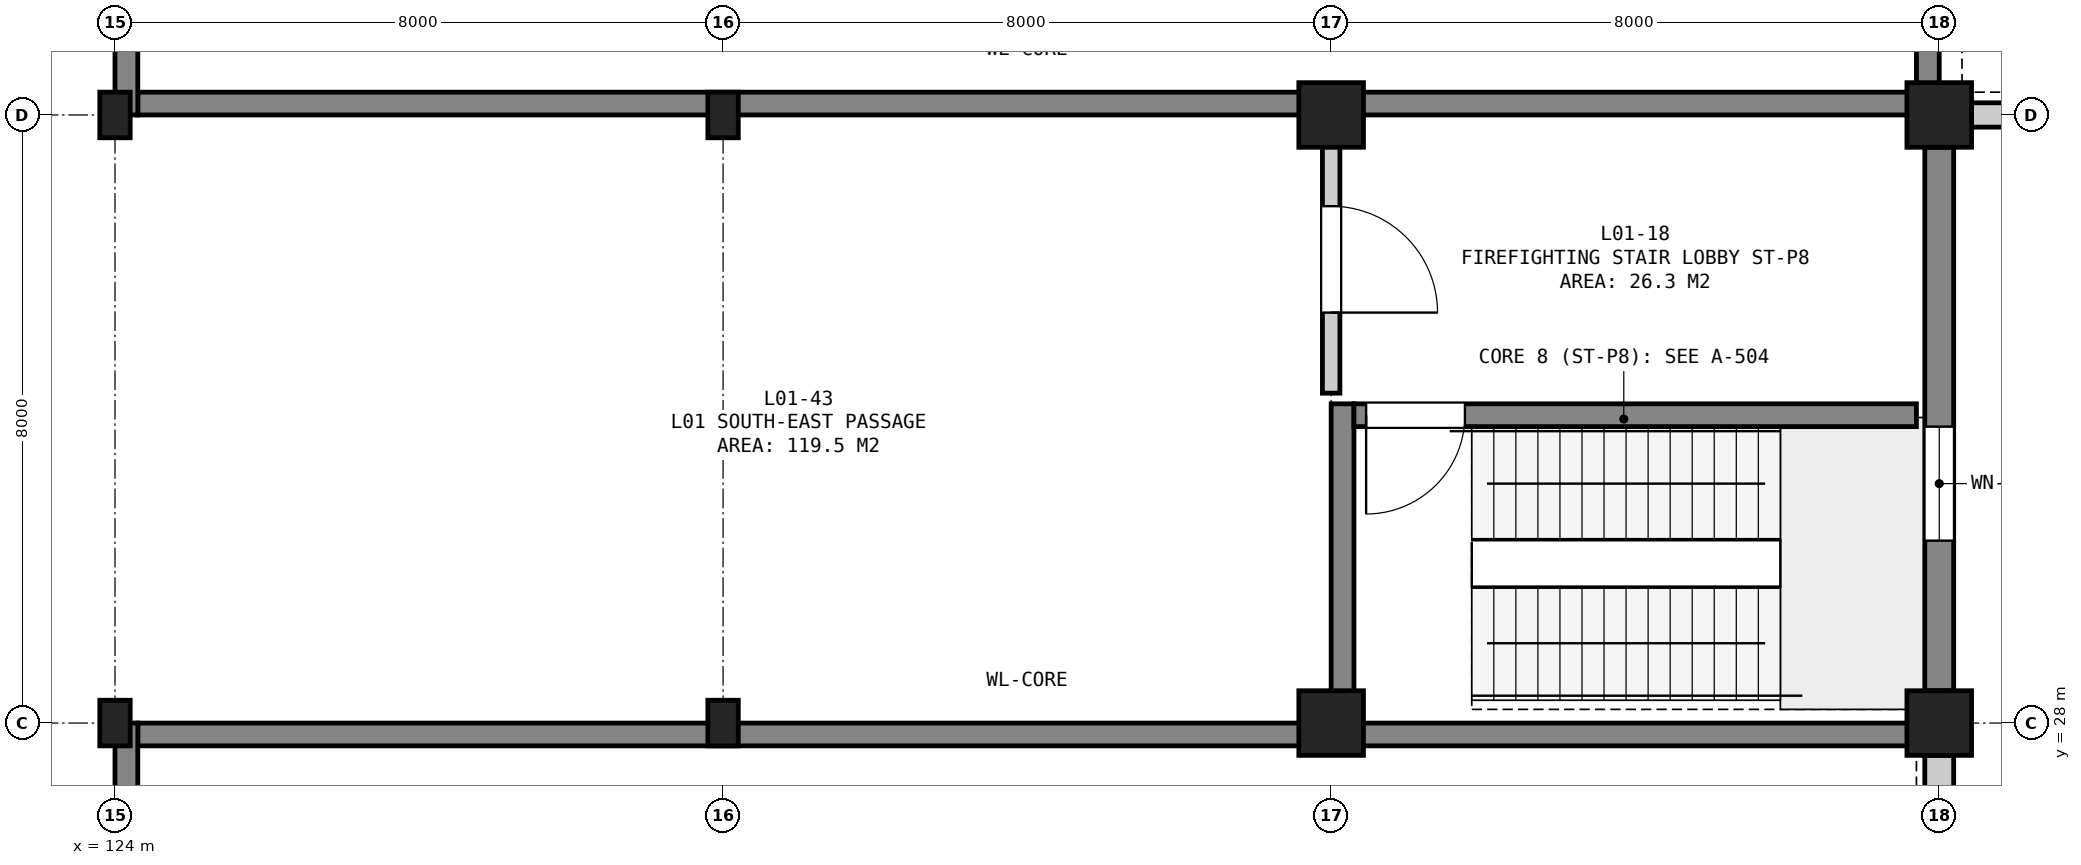
"""IFC4 building model, lengths in metres.
Left out: names, types, materials, properties, quantities, classifications, styles, units other than length and angle.
Written with IfcOpenShell. Run it as: python <this file> out.ifc"""

import sys

from ifc_helpers import new_model, si_unit, direction, frame, frame_2d, origin, origin_2d, place, context, subcontext, project, spatial, rectangle, extrude, element, fill, save


model = new_model("IFC4")
c1 = context("Model", 3, precision=1e-05, world=origin(), true_north=direction((0.0, 1.0)))
c2 = subcontext(c1, "Body", "Model", "MODEL_VIEW")
j1 = project(units=[si_unit("LENGTHUNIT", "METRE"), si_unit("PLANEANGLEUNIT", "RADIAN")], contexts=[c1])
p1 = place(None, origin())
s1 = spatial("IfcSite", under=j1, at=p1, CompositionType="ELEMENT")
p2 = place(p1, origin())
s2 = spatial("IfcBuilding", under=s1, at=p2, CompositionType="ELEMENT")
p3 = place(p2, frame((0.0, 0.0, 5.4)))
s3 = spatial("IfcBuildingStorey", under=s2, at=p3, CompositionType="ELEMENT", Elevation=5.4)
for number, where, z_axis, x_axis in (
    (1, (124.0, 28.0, 0.0), (0.0, 0.0, 1.0), (1.0, 0.0, 0.0)),
    (2, (124.0, 36.0, 0.0), (0.0, 0.0, 1.0), (1.0, 0.0, 0.0)),
    (3, (132.0, 28.0, 0.0), (0.0, 0.0, 1.0), (1.0, 0.0, 0.0)),
    (4, (132.0, 36.0, 0.0), (0.0, 0.0, 1.0), (1.0, 0.0, 0.0)),
):
    element("IfcColumn", number, at=place(p3, frame(where, z_axis=z_axis, x_axis=x_axis)), inside=s3, PredefinedType="COLUMN", context=c2, shape_type="SweptSolid", body=[
        extrude(rectangle(XDim=0.4, YDim=0.6, at=origin_2d()), origin(), (0.0, 0.0, 1.0), 5.4),
    ])
for number, where, z_axis, x_axis in (
    (5, (140.0, 28.0, 0.0), (0.0, 0.0, 1.0), (1.0, 0.0, 0.0)),
    (6, (140.0, 36.0, 0.0), (0.0, 0.0, 1.0), (1.0, 0.0, 0.0)),
    (7, (148.0, 28.0, 0.0), (0.0, 0.0, 1.0), (1.0, 0.0, 0.0)),
    (8, (148.0, 36.0, 0.0), (0.0, 0.0, 1.0), (1.0, 0.0, 0.0)),
):
    element("IfcColumn", number, at=place(p3, frame(where, z_axis=z_axis, x_axis=x_axis)), inside=s3, PredefinedType="COLUMN", context=c2, shape_type="SweptSolid", body=[
        extrude(rectangle(XDim=0.85, YDim=0.85, at=origin_2d()), origin(), (0.0, 0.0, 1.0), 5.4),
    ])
p4 = place(p3, frame((148.0, 13.1, 0.0), z_axis=(0.0, 0.0, 1.0), x_axis=(0.0, 1.0, 0.0)))
e9 = element("IfcWall", 9, at=p4, inside=s3, PredefinedType="SOLIDWALL", context=c2, shape_type="SweptSolid", body=[
    extrude(rectangle(XDim=14.475, YDim=0.38, at=frame_2d((7.237, 0.0))), origin(), (0.0, 0.0, 1.0), 4.035),
])
p5 = place(p3, frame((148.0, 28.425, 0.0), z_axis=(0.0, 0.0, 1.0), x_axis=(0.0, 1.0, 0.0)))
e10 = element("IfcWall", 10, at=p5, inside=s3, PredefinedType="SOLIDWALL", context=c2, shape_type="SweptSolid", body=[
    extrude(rectangle(XDim=7.15, YDim=0.38, at=frame_2d((3.575, 0.0))), origin(), (0.0, 0.0, 1.0), 4.735),
])
p6 = place(p5, frame((1.975, 0.0, 0.9)))
e11 = element("IfcOpeningElement", 11, at=p6, cuts=e10, PredefinedType="OPENING", context=c2, shape_type="SweptSolid", body=[
    extrude(rectangle(XDim=1.5, YDim=1.85, at=frame_2d((0.75, 0.925))), frame((0.0, 0.202, 0.0), z_axis=(0.0, -1.0, 0.0), x_axis=(1.0, 0.0, 0.0)), (0.0, 0.0, 1.0), 0.404),
])
p7 = place(p3, frame((148.425, 36.0, 0.0), z_axis=(0.0, 0.0, 1.0), x_axis=(1.0, 0.0, 0.0)))
e12 = element("IfcWall", 12, at=p7, inside=s3, PredefinedType="SOLIDWALL", context=c2, shape_type="SweptSolid", body=[
    extrude(rectangle(XDim=12.8, YDim=0.32, at=frame_2d((6.4, 0.0))), origin(), (0.0, 0.0, 1.0), 4.435),
])
p8 = place(p3, frame((124.3, 27.85, 0.0), z_axis=(0.0, 0.0, 1.0), x_axis=(1.0, 0.0, 0.0)))
e13 = element("IfcWall", 13, at=p8, inside=s3, PredefinedType="SHEAR", context=c2, shape_type="SweptSolid", body=[
    extrude(rectangle(XDim=23.4, YDim=0.3, at=frame_2d((11.7, 0.0))), origin(), (0.0, 0.0, 1.0), 5.1),
])
p9 = place(p3, frame((124.15, 12.8, 0.0), z_axis=(0.0, 0.0, 1.0), x_axis=(0.0, 1.0, 0.0)))
e14 = element("IfcWall", 14, at=p9, inside=s3, PredefinedType="SHEAR", context=c2, shape_type="SweptSolid", body=[
    extrude(rectangle(XDim=15.2, YDim=0.3, at=frame_2d((7.6, 0.0))), origin(), (0.0, 0.0, 1.0), 5.1),
])
p10 = place(p3, frame((124.3, 36.15, 0.0), z_axis=(0.0, 0.0, 1.0), x_axis=(1.0, 0.0, 0.0)))
e15 = element("IfcWall", 15, at=p10, inside=s3, PredefinedType="SHEAR", context=c2, shape_type="SweptSolid", body=[
    extrude(rectangle(XDim=23.4, YDim=0.3, at=frame_2d((11.7, 0.0))), origin(), (0.0, 0.0, 1.0), 5.1),
])
for number, where, z_axis, x_axis in (
    (16, (124.15, 36.0, 0.0), (0.0, 0.0, 1.0), (0.0, 1.0, 0.0)),
    (17, (147.85, 36.0, 0.0), (0.0, 0.0, 1.0), (0.0, 1.0, 0.0)),
):
    element("IfcWall", number, at=place(p3, frame(where, z_axis=z_axis, x_axis=x_axis)), inside=s3, PredefinedType="SHEAR", context=c2, shape_type="SweptSolid", body=[
        extrude(rectangle(XDim=15.2, YDim=0.3, at=frame_2d((7.6, 0.0))), origin(), (0.0, 0.0, 1.0), 5.1),
    ])
p11 = place(p3, frame((140.15, 28.0, 0.0), z_axis=(0.0, 0.0, 1.0), x_axis=(0.0, 1.0, 0.0)))
e18 = element("IfcWall", 18, at=p11, inside=s3, PredefinedType="SHEAR", context=c2, shape_type="SweptSolid", body=[
    extrude(rectangle(XDim=4.2, YDim=0.3, at=frame_2d((2.1, 0.0))), origin(), (0.0, 0.0, 1.0), 5.1),
])
p12 = place(p3, frame((140.3, 32.05, 0.0), z_axis=(0.0, 0.0, 1.0), x_axis=(1.0, 0.0, 0.0)))
e19 = element("IfcWall", 19, at=p12, inside=s3, PredefinedType="SHEAR", context=c2, shape_type="SweptSolid", body=[
    extrude(rectangle(XDim=7.4, YDim=0.3, at=frame_2d((3.7, 0.0))), origin(), (0.0, 0.0, 1.0), 5.1),
])
p13 = place(p12, frame((0.16, 0.0, 0.0)))
e20 = element("IfcOpeningElement", 20, at=p13, cuts=e19, PredefinedType="OPENING", context=c2, shape_type="SweptSolid", body=[
    extrude(rectangle(XDim=1.3, YDim=2.18, at=frame_2d((0.65, 1.09))), frame((0.0, 0.162, 0.0), z_axis=(0.0, -1.0, 0.0), x_axis=(1.0, 0.0, 0.0)), (0.0, 0.0, 1.0), 0.324),
])
p14 = place(p3, frame((140.0, 32.34, 0.0), z_axis=(0.0, 0.0, 1.0), x_axis=(0.0, 1.0, 0.0)))
e21 = element("IfcWall", 21, at=p14, inside=s3, PredefinedType="SOLIDWALL", context=c2, shape_type="SweptSolid", body=[
    extrude(rectangle(XDim=3.52, YDim=0.23, at=frame_2d((1.76, 0.0))), origin(), (0.0, 0.0, 1.0), 4.185),
])
p15 = place(p14, frame((1.06, 0.0, 0.0)))
e22 = element("IfcOpeningElement", 22, at=p15, cuts=e21, PredefinedType="OPENING", context=c2, shape_type="SweptSolid", body=[
    extrude(rectangle(XDim=1.4, YDim=2.2, at=frame_2d((0.7, 1.1))), frame((0.0, 0.127, 0.0), z_axis=(0.0, -1.0, 0.0), x_axis=(1.0, 0.0, 0.0)), (0.0, 0.0, 1.0), 0.254),
])
p16 = place(p6, origin())
e23 = element("IfcWindow", 23, at=p16, inside=s3, PartitioningType="SINGLE_PANEL", PredefinedType="WINDOW", context=c2, shape_type="SweptSolid", body=[
    extrude(rectangle(XDim=1.5, YDim=1.85, at=frame_2d((0.75, 0.925))), frame((0.0, 0.03, 0.0), z_axis=(0.0, -1.0, 0.0), x_axis=(1.0, 0.0, 0.0)), (0.0, 0.0, 1.0), 0.06),
])
fill(e11, e23)
p17 = place(p13, frame((1.3, 0.0, 0.0), z_axis=(0.0, 0.0, 1.0), x_axis=(-1.0, 0.0, 0.0)))
e24 = element("IfcDoor", 24, at=p17, inside=s3, OperationType="SINGLE_SWING_RIGHT", PredefinedType="DOOR", context=c2, shape_type="SweptSolid", body=[
    extrude(rectangle(XDim=1.3, YDim=2.18, at=frame_2d((0.65, 1.09))), frame((0.0, 0.025, 0.0), z_axis=(0.0, -1.0, 0.0), x_axis=(1.0, 0.0, 0.0)), (0.0, 0.0, 1.0), 0.05),
])
fill(e20, e24)
p18 = place(p15, frame((1.4, 0.0, 0.0), z_axis=(0.0, 0.0, 1.0), x_axis=(-1.0, 0.0, 0.0)))
e25 = element("IfcDoor", 25, at=p18, inside=s3, OperationType="SINGLE_SWING_RIGHT", PredefinedType="DOOR", context=c2, shape_type="SweptSolid", body=[
    extrude(rectangle(XDim=1.4, YDim=2.2, at=frame_2d((0.7, 1.1))), frame((0.0, 0.025, 0.0), z_axis=(0.0, -1.0, 0.0), x_axis=(1.0, 0.0, 0.0)), (0.0, 0.0, 1.0), 0.05),
])
fill(e22, e25)
save(model, sys.argv[1])
